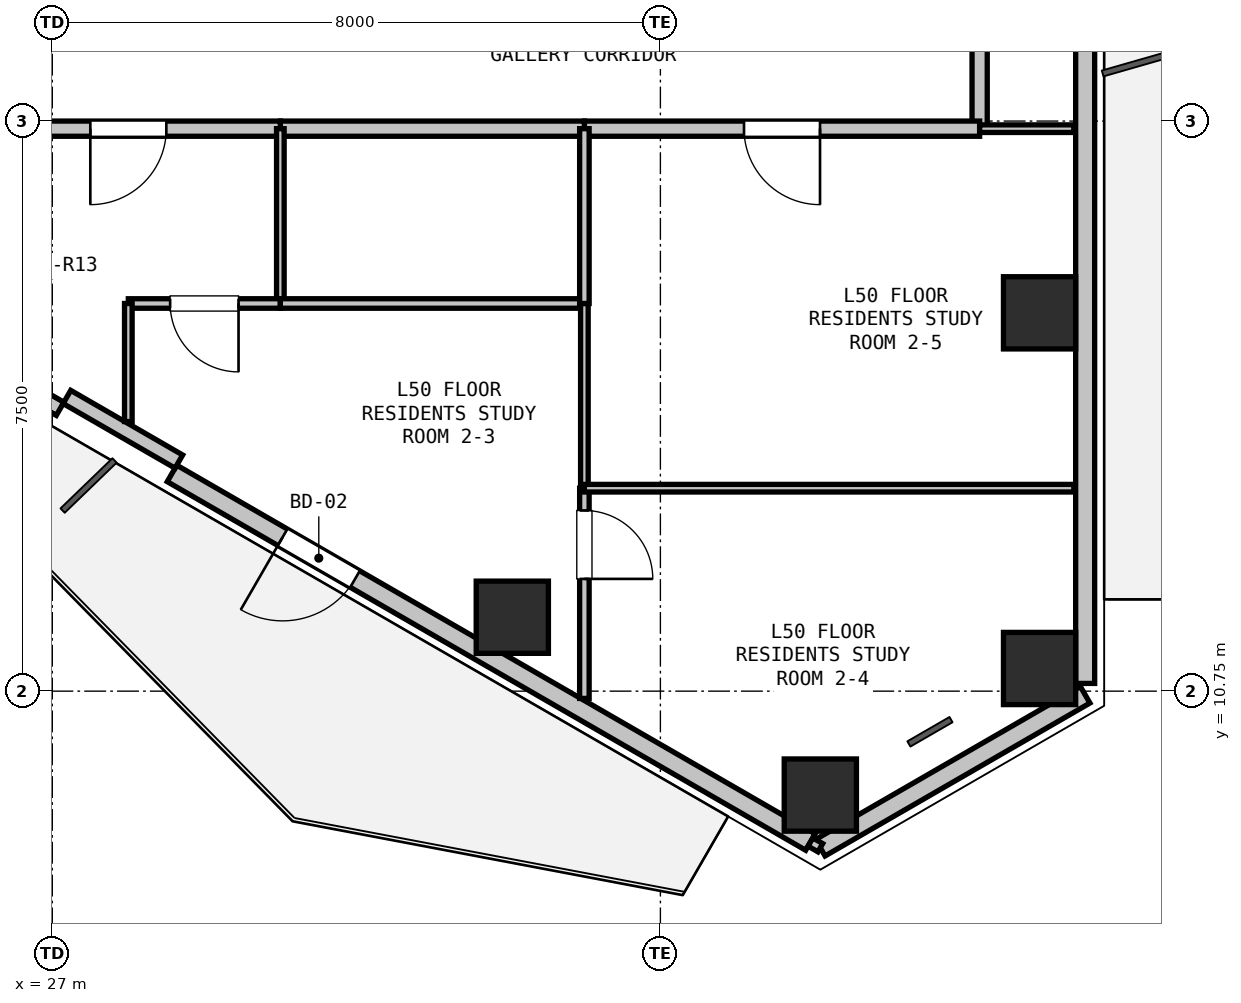
"""IFC4 building model, lengths in metres.
Left out: names, types, materials, properties, quantities, classifications, styles, units other than length and angle.
Written with IfcOpenShell. Run it as: python <this file> out.ifc"""

import sys

from ifc_helpers import new_model, si_unit, direction, frame, frame_2d, origin, origin_2d, place, context, subcontext, project, spatial, rectangle, hollow_rectangle, extrude, element, fill, save


model = new_model("IFC4")
c1 = context("Model", 3, precision=1e-05, world=origin(), true_north=direction((0.0, 1.0)))
c2 = subcontext(c1, "Body", "Model", "MODEL_VIEW")
j1 = project(units=[si_unit("LENGTHUNIT", "METRE"), si_unit("PLANEANGLEUNIT", "RADIAN")], contexts=[c1])
p1 = place(None, origin())
s1 = spatial("IfcSite", under=j1, at=p1, CompositionType="ELEMENT")
p2 = place(p1, origin())
s2 = spatial("IfcBuilding", under=s1, at=p2, CompositionType="ELEMENT")
p3 = place(p2, frame((0.0, 0.0, 182.1)))
s3 = spatial("IfcBuildingStorey", under=s2, at=p3, CompositionType="ELEMENT", Elevation=182.1)
for number, where, z_axis, x_axis in (
    (1, (39.988, 15.727, 0.0), (0.0, 0.0, 1.0), (1.0, 0.0, 0.0)),
    (2, (39.988, 11.048, 0.0), (0.0, 0.0, 1.0), (1.0, 0.0, 0.0)),
    (3, (37.104, 9.383, 0.0), (0.0, 0.0, 1.0), (1.0, 0.0, 0.0)),
    (4, (33.052, 11.722, 0.0), (0.0, 0.0, 1.0), (1.0, 0.0, 0.0)),
):
    element("IfcColumn", number, at=place(p3, frame(where, z_axis=z_axis, x_axis=x_axis)), inside=s3, PredefinedType="COLUMN", context=c2, shape_type="SweptSolid", body=[
        extrude(hollow_rectangle(XDim=0.95, YDim=0.95, WallThickness=0.028, at=origin_2d()), origin(), (0.0, 0.0, 1.0), 3.3),
    ])
p4 = place(p3, frame((40.588, 10.702, 0.0), z_axis=(0.0, 0.0, 1.0), x_axis=(-0.866023907196, -0.500002592159, 0.0)))
e5 = element("IfcWall", 5, at=p4, inside=s3, PredefinedType="SOLIDWALL", context=c2, shape_type="SweptSolid", body=[
    extrude(rectangle(XDim=4.023, YDim=0.25, at=frame_2d((2.012, 0.0))), origin(), (0.0, 0.0, 1.0), 2.69),
])
p5 = place(p3, frame((40.588, 20.551, 0.0), z_axis=(0.0, 0.0, 1.0), x_axis=(0.0, -1.0, 0.0)))
e6 = element("IfcWall", 6, at=p5, inside=s3, PredefinedType="SOLIDWALL", context=c2, shape_type="SweptSolid", body=[
    extrude(rectangle(XDim=9.699, YDim=0.25, at=frame_2d((4.85, 0.0))), origin(), (0.0, 0.0, 1.0), 2.69),
])
p6 = place(p3, frame((36.974, 8.765, 0.0), z_axis=(0.0, 0.0, 1.0), x_axis=(-0.866016233231, 0.500015883528, 0.0)))
e7 = element("IfcWall", 7, at=p6, inside=s3, PredefinedType="SOLIDWALL", context=c2, shape_type="SweptSolid", body=[
    extrude(rectangle(XDim=9.699, YDim=0.25, at=frame_2d((4.85, 0.0))), origin(), (0.0, 0.0, 1.0), 2.69),
])
p7 = place(p6, frame((6.919, 0.0, 0.0)))
e8 = element("IfcOpeningElement", 8, at=p7, cuts=e7, PredefinedType="OPENING", context=c2, shape_type="SweptSolid", body=[
    extrude(rectangle(XDim=1.1, YDim=2.1, at=frame_2d((0.55, 1.05))), frame((0.0, 0.135, 0.0), z_axis=(0.0, -1.0, 0.0), x_axis=(1.0, 0.0, 0.0)), (0.0, 0.0, 1.0), 0.27),
])
p8 = place(p3, frame((27.102, 14.464, 0.0), z_axis=(0.0, 0.0, 1.0), x_axis=(-0.866020680503, 0.500008180874, 0.0)))
e9 = element("IfcWall", 9, at=p8, inside=s3, PredefinedType="PARAPET", context=c2, shape_type="SweptSolid", body=[
    extrude(rectangle(XDim=8.999, YDim=0.2, at=frame_2d((4.5, 0.0))), origin(), (0.0, 0.0, 1.0), 0.2),
])
p9 = place(p3, frame((28.665, 13.77, 0.0), z_axis=(0.0, 0.0, 1.0), x_axis=(-0.866025371046, 0.500000056704, 0.0)))
e10 = element("IfcWall", 10, at=p9, inside=s3, PredefinedType="PARAPET", context=c2, shape_type="SweptSolid", body=[
    extrude(rectangle(XDim=1.7, YDim=0.2, at=frame_2d((0.85, 0.0))), origin(), (0.0, 0.0, 1.0), 2.69),
])
p10 = place(p3, frame((39.2, 19.9, 0.0), z_axis=(0.0, 0.0, 1.0), x_axis=(0.0, -1.0, 0.0)))
e11 = element("IfcWall", 11, at=p10, inside=s3, PredefinedType="PARTITIONING", context=c2, shape_type="SweptSolid", body=[
    extrude(rectangle(XDim=1.75, YDim=0.2, at=frame_2d((0.875, 0.0))), origin(), (0.0, 0.0, 1.0), 3.07),
])
p11 = place(p3, frame((39.2, 18.15, 0.0), z_axis=(0.0, 0.0, 1.0), x_axis=(-1.0, 0.0, 0.0)))
e12 = element("IfcWall", 12, at=p11, inside=s3, PredefinedType="PARTITIONING", context=c2, shape_type="SweptSolid", body=[
    extrude(rectangle(XDim=5.2, YDim=0.2, at=frame_2d((2.6, 0.0))), origin(), (0.0, 0.0, 1.0), 2.518),
])
p12 = place(p11, frame((2.1, 0.0, 0.0)))
e13 = element("IfcOpeningElement", 13, at=p12, cuts=e12, PredefinedType="OPENING", context=c2, shape_type="SweptSolid", body=[
    extrude(rectangle(XDim=1.0, YDim=2.15, at=frame_2d((0.5, 1.075))), frame((0.0, 0.11, 0.0), z_axis=(0.0, -1.0, 0.0), x_axis=(1.0, 0.0, 0.0)), (0.0, 0.0, 1.0), 0.22),
])
p13 = place(p3, frame((34.0, 18.15, 0.0), z_axis=(0.0, 0.0, 1.0), x_axis=(-1.0, 0.0, 0.0)))
e14 = element("IfcWall", 14, at=p13, inside=s3, PredefinedType="PARTITIONING", context=c2, shape_type="SweptSolid", body=[
    extrude(rectangle(XDim=4.0, YDim=0.2, at=frame_2d((2.0, 0.0))), origin(), (0.0, 0.0, 1.0), 3.07),
])
p14 = place(p3, frame((30.0, 18.15, 0.0), z_axis=(0.0, 0.0, 1.0), x_axis=(-1.0, 0.0, 0.0)))
e15 = element("IfcWall", 15, at=p14, inside=s3, PredefinedType="PARTITIONING", context=c2, shape_type="SweptSolid", body=[
    extrude(rectangle(XDim=4.0, YDim=0.2, at=frame_2d((2.0, 0.0))), origin(), (0.0, 0.0, 1.0), 3.07),
])
p15 = place(p14, frame((1.5, 0.0, 0.0)))
e16 = element("IfcOpeningElement", 16, at=p15, cuts=e15, PredefinedType="OPENING", context=c2, shape_type="SweptSolid", body=[
    extrude(rectangle(XDim=1.0, YDim=2.15, at=frame_2d((0.5, 1.075))), frame((0.0, 0.11, 0.0), z_axis=(0.0, -1.0, 0.0), x_axis=(1.0, 0.0, 0.0)), (0.0, 0.0, 1.0), 0.22),
])
p16 = place(p3, frame((30.0, 18.15, 0.0), z_axis=(0.0, 0.0, 1.0), x_axis=(0.0, -1.0, 0.0)))
e17 = element("IfcWall", 17, at=p16, inside=s3, PredefinedType="PARTITIONING", context=c2, shape_type="SweptSolid", body=[
    extrude(rectangle(XDim=2.3, YDim=0.1, at=frame_2d((1.15, 0.0))), origin(), (0.0, 0.0, 1.0), 3.07),
])
p17 = place(p3, frame((30.0, 15.85, 0.0), z_axis=(0.0, 0.0, 1.0), x_axis=(-1.0, 0.0, 0.0)))
e18 = element("IfcWall", 18, at=p17, inside=s3, PredefinedType="PARTITIONING", context=c2, shape_type="SweptSolid", body=[
    extrude(rectangle(XDim=2.0, YDim=0.125, at=frame_2d((1.0, 0.0))), origin(), (0.0, 0.0, 1.0), 3.07),
])
p18 = place(p17, frame((0.55, 0.0, 0.0)))
e19 = element("IfcOpeningElement", 19, at=p18, cuts=e18, PredefinedType="OPENING", context=c2, shape_type="SweptSolid", body=[
    extrude(rectangle(XDim=0.9, YDim=2.1, at=frame_2d((0.45, 1.05))), frame((0.0, 0.073, 0.0), z_axis=(0.0, -1.0, 0.0), x_axis=(1.0, 0.0, 0.0)), (0.0, 0.0, 1.0), 0.145),
])
p19 = place(p3, frame((28.0, 15.85, 0.0), z_axis=(0.0, 0.0, 1.0), x_axis=(0.0, -1.0, 0.0)))
e20 = element("IfcWall", 20, at=p19, inside=s3, PredefinedType="PARTITIONING", context=c2, shape_type="SweptSolid", body=[
    extrude(rectangle(XDim=1.553, YDim=0.1, at=frame_2d((0.776, 0.0))), origin(), (0.0, 0.0, 1.0), 2.365),
])
p20 = place(p3, frame((30.0, 15.85, 0.0), z_axis=(0.0, 0.0, 1.0), x_axis=(1.0, 0.0, 0.0)))
e21 = element("IfcWall", 21, at=p20, inside=s3, PredefinedType="PARTITIONING", context=c2, shape_type="SweptSolid", body=[
    extrude(rectangle(XDim=4.0, YDim=0.125, at=frame_2d((2.0, 0.0))), origin(), (0.0, 0.0, 1.0), 3.07),
])
p21 = place(p3, frame((34.0, 15.85, 0.0), z_axis=(0.0, 0.0, 1.0), x_axis=(0.0, -1.0, 0.0)))
e22 = element("IfcWall", 22, at=p21, inside=s3, PredefinedType="PARTITIONING", context=c2, shape_type="SweptSolid", body=[
    extrude(rectangle(XDim=2.43, YDim=0.1, at=frame_2d((1.215, 0.0))), origin(), (0.0, 0.0, 1.0), 3.07),
])
p22 = place(p3, frame((34.0, 13.42, 0.0), z_axis=(0.0, 0.0, 1.0), x_axis=(0.0, -1.0, 0.0)))
e23 = element("IfcWall", 23, at=p22, inside=s3, PredefinedType="PARTITIONING", context=c2, shape_type="SweptSolid", body=[
    extrude(rectangle(XDim=2.766, YDim=0.125, at=frame_2d((1.383, 0.0))), origin(), (0.0, 0.0, 1.0), 2.734),
])
p23 = place(p22, frame((0.293, 0.0, 0.0)))
e24 = element("IfcOpeningElement", 24, at=p23, cuts=e23, PredefinedType="OPENING", context=c2, shape_type="SweptSolid", body=[
    extrude(rectangle(XDim=0.9, YDim=2.1, at=frame_2d((0.45, 1.05))), frame((0.0, 0.073, 0.0), z_axis=(0.0, -1.0, 0.0), x_axis=(1.0, 0.0, 0.0)), (0.0, 0.0, 1.0), 0.145),
])
p24 = place(p3, frame((34.0, 13.42, 0.0), z_axis=(0.0, 0.0, 1.0), x_axis=(1.0, 0.0, 0.0)))
e25 = element("IfcWall", 25, at=p24, inside=s3, PredefinedType="PARTITIONING", context=c2, shape_type="SweptSolid", body=[
    extrude(rectangle(XDim=6.439, YDim=0.1, at=frame_2d((3.22, 0.0))), origin(), (0.0, 0.0, 1.0), 2.518),
])
p25 = place(p3, frame((37.104, 8.69, 0.0), z_axis=(0.0, 0.0, 1.0), x_axis=(-0.866131372301, 0.499816412211, 0.0)))
e26 = element("IfcWall", 26, at=p25, inside=s3, PredefinedType="PARTITIONING", context=c2, shape_type="SweptSolid", body=[
    extrude(rectangle(XDim=0.15, YDim=0.125, at=frame_2d((0.075, 0.0))), origin(), (0.0, 0.0, 1.0), 3.07),
])
p26 = place(p3, frame((39.2, 18.15, 0.0), z_axis=(0.0, 0.0, 1.0), x_axis=(1.0, 0.0, 0.0)))
e27 = element("IfcWall", 27, at=p26, inside=s3, PredefinedType="PARTITIONING", context=c2, shape_type="SweptSolid", body=[
    extrude(rectangle(XDim=1.24, YDim=0.1, at=frame_2d((0.62, 0.0))), origin(), (0.0, 0.0, 1.0), 2.365),
])
p27 = place(p3, frame((34.0, 15.85, 0.0), z_axis=(0.0, 0.0, 1.0), x_axis=(0.0, 1.0, 0.0)))
e28 = element("IfcWall", 28, at=p27, inside=s3, PredefinedType="PARTITIONING", context=c2, shape_type="SweptSolid", body=[
    extrude(rectangle(XDim=2.3, YDim=0.125, at=frame_2d((1.15, 0.0))), origin(), (0.0, 0.0, 1.0), 3.07),
])
p28 = place(p7, origin())
e29 = element("IfcDoor", 29, at=p28, inside=s3, OperationType="SINGLE_SWING_RIGHT", PredefinedType="DOOR", context=c2, shape_type="SweptSolid", body=[
    extrude(rectangle(XDim=1.1, YDim=2.1, at=frame_2d((0.55, 1.05))), frame((0.0, 0.025, 0.0), z_axis=(0.0, -1.0, 0.0), x_axis=(1.0, 0.0, 0.0)), (0.0, 0.0, 1.0), 0.05),
])
fill(e8, e29)
p29 = place(p15, origin())
e30 = element("IfcDoor", 30, at=p29, inside=s3, OperationType="SINGLE_SWING_RIGHT", PredefinedType="DOOR", context=c2, shape_type="SweptSolid", body=[
    extrude(rectangle(XDim=1.0, YDim=2.15, at=frame_2d((0.5, 1.075))), frame((0.0, 0.025, 0.0), z_axis=(0.0, -1.0, 0.0), x_axis=(1.0, 0.0, 0.0)), (0.0, 0.0, 1.0), 0.05),
])
fill(e16, e30)
p30 = place(p12, origin())
e31 = element("IfcDoor", 31, at=p30, inside=s3, OperationType="SINGLE_SWING_LEFT", PredefinedType="DOOR", context=c2, shape_type="SweptSolid", body=[
    extrude(rectangle(XDim=1.0, YDim=2.15, at=frame_2d((0.5, 1.075))), frame((0.0, 0.025, 0.0), z_axis=(0.0, -1.0, 0.0), x_axis=(1.0, 0.0, 0.0)), (0.0, 0.0, 1.0), 0.05),
])
fill(e13, e31)
p31 = place(p18, origin())
e32 = element("IfcDoor", 32, at=p31, inside=s3, OperationType="SINGLE_SWING_LEFT", PredefinedType="DOOR", context=c2, shape_type="SweptSolid", body=[
    extrude(rectangle(XDim=0.9, YDim=2.1, at=frame_2d((0.45, 1.05))), frame((0.0, 0.025, 0.0), z_axis=(0.0, -1.0, 0.0), x_axis=(1.0, 0.0, 0.0)), (0.0, 0.0, 1.0), 0.05),
])
fill(e19, e32)
p32 = place(p23, origin())
e33 = element("IfcDoor", 33, at=p32, inside=s3, OperationType="SINGLE_SWING_RIGHT", PredefinedType="DOOR", context=c2, shape_type="SweptSolid", body=[
    extrude(rectangle(XDim=0.9, YDim=2.1, at=frame_2d((0.45, 1.05))), frame((0.0, 0.025, 0.0), z_axis=(0.0, -1.0, 0.0), x_axis=(1.0, 0.0, 0.0)), (0.0, 0.0, 1.0), 0.05),
])
fill(e24, e33)
save(model, sys.argv[1])
